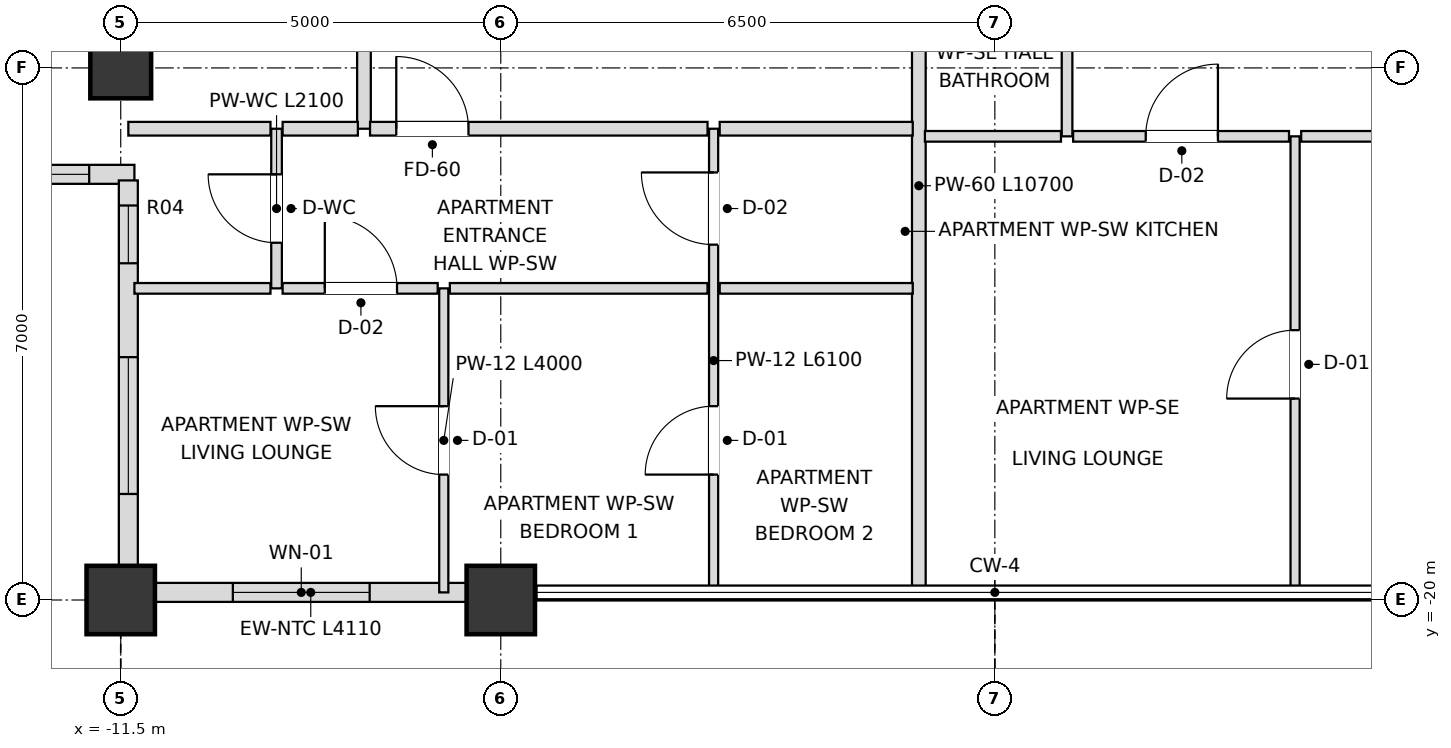
"""IFC4 building model, lengths in metres.
Left out: names, types, materials, properties, quantities, classifications, styles, units other than length and angle.
Written with IfcOpenShell. Run it as: python <this file> out.ifc"""

import sys

from ifc_helpers import new_model, si_unit, direction, frame, frame_2d, origin, origin_2d, place, context, subcontext, project, spatial, rectangle, extrude, element, fill, save


model = new_model("IFC4")
c1 = context("Model", 3, precision=1e-05, world=origin(), true_north=direction((0.0, 1.0)))
c2 = subcontext(c1, "Body", "Model", "MODEL_VIEW")
j1 = project(units=[si_unit("LENGTHUNIT", "METRE"), si_unit("PLANEANGLEUNIT", "RADIAN")], contexts=[c1])
p1 = place(None, origin())
s1 = spatial("IfcSite", under=j1, at=p1, CompositionType="ELEMENT")
p2 = place(p1, origin())
s2 = spatial("IfcBuilding", under=s1, at=p2, CompositionType="ELEMENT")
p3 = place(p2, frame((0.0, 0.0, 261.9)))
s3 = spatial("IfcBuildingStorey", under=s2, at=p3, CompositionType="ELEMENT", Elevation=261.9)
for number, where, z_axis, x_axis in (
    (1, (-11.5, -20.0, 0.0), (0.0, 0.0, 1.0), (1.0, 0.0, 0.0)),
    (2, (-6.5, -20.0, 0.0), (0.0, 0.0, 1.0), (1.0, 0.0, 0.0)),
):
    element("IfcColumn", number, at=place(p3, frame(where, z_axis=z_axis, x_axis=x_axis)), inside=s3, PredefinedType="USERDEFINED", context=c2, shape_type="SweptSolid", body=[
        extrude(rectangle(XDim=0.9, YDim=0.9, at=origin_2d()), origin(), (0.0, 0.0, 1.0), 3.6),
    ])
p4 = place(p3, frame((-11.5, -13.0, 0.0), z_axis=(0.0, 0.0, 1.0), x_axis=(1.0, 0.0, 0.0)))
e3 = element("IfcColumn", 3, at=p4, inside=s3, PredefinedType="COLUMN", context=c2, shape_type="SweptSolid", body=[
    extrude(rectangle(XDim=0.8, YDim=0.8, at=origin_2d()), origin(), (0.0, 0.0, 1.0), 3.6),
])
p5 = place(p3, frame((-11.055, -19.9, 0.0), z_axis=(0.0, 0.0, 1.0), x_axis=(1.0, 0.0, 0.0)))
e4 = element("IfcWall", 4, at=p5, inside=s3, PredefinedType="SOLIDWALL", context=c2, shape_type="SweptSolid", body=[
    extrude(rectangle(XDim=4.11, YDim=0.25, at=frame_2d((2.055, 0.0))), origin(), (0.0, 0.0, 1.0), 2.748),
])
p6 = place(p5, frame((1.03, 0.0, 0.72)))
e5 = element("IfcOpeningElement", 5, at=p6, cuts=e4, PredefinedType="OPENING", context=c2, shape_type="SweptSolid", body=[
    extrude(rectangle(XDim=1.8, YDim=1.68, at=frame_2d((0.9, 0.84))), frame((0.0, 0.135, 0.0), z_axis=(0.0, -1.0, 0.0), x_axis=(1.0, 0.0, 0.0)), (0.0, 0.0, 1.0), 0.27),
])
p7 = place(p3, frame((-16.98, -14.4, 0.0), z_axis=(0.0, 0.0, 1.0), x_axis=(1.0, 0.0, 0.0)))
e6 = element("IfcWall", 6, at=p7, inside=s3, PredefinedType="SOLIDWALL", context=c2, shape_type="SweptSolid", body=[
    extrude(rectangle(XDim=5.66, YDim=0.25, at=frame_2d((2.83, 0.0))), origin(), (0.0, 0.0, 1.0), 2.748),
])
p8 = place(p7, frame((0.595, 0.0, 0.72)))
e7 = element("IfcOpeningElement", 7, at=p8, cuts=e6, PredefinedType="OPENING", context=c2, shape_type="SweptSolid", body=[
    extrude(rectangle(XDim=1.8, YDim=1.68, at=frame_2d((0.9, 0.84))), frame((0.0, 0.135, 0.0), z_axis=(0.0, -1.0, 0.0), x_axis=(1.0, 0.0, 0.0)), (0.0, 0.0, 1.0), 0.27),
])
p9 = place(p7, frame((3.265, 0.0, 0.72)))
e8 = element("IfcOpeningElement", 8, at=p9, cuts=e6, PredefinedType="OPENING", context=c2, shape_type="SweptSolid", body=[
    extrude(rectangle(XDim=1.8, YDim=1.68, at=frame_2d((0.9, 0.84))), frame((0.0, 0.135, 0.0), z_axis=(0.0, -1.0, 0.0), x_axis=(1.0, 0.0, 0.0)), (0.0, 0.0, 1.0), 0.27),
])
p10 = place(p3, frame((-11.4, -14.48, 0.0), z_axis=(0.0, 0.0, 1.0), x_axis=(0.0, -1.0, 0.0)))
e9 = element("IfcWall", 9, at=p10, inside=s3, PredefinedType="SOLIDWALL", context=c2, shape_type="SweptSolid", body=[
    extrude(rectangle(XDim=5.34, YDim=0.25, at=frame_2d((2.67, 0.0))), origin(), (0.0, 0.0, 1.0), 2.748),
])
p11 = place(p10, frame((0.33, 0.0, 0.72)))
e10 = element("IfcOpeningElement", 10, at=p11, cuts=e9, PredefinedType="OPENING", context=c2, shape_type="SweptSolid", body=[
    extrude(rectangle(XDim=0.76, YDim=1.68, at=frame_2d((0.38, 0.84))), frame((0.0, 0.135, 0.0), z_axis=(0.0, -1.0, 0.0), x_axis=(1.0, 0.0, 0.0)), (0.0, 0.0, 1.0), 0.27),
])
p12 = place(p10, frame((2.325, 0.0, 0.72)))
e11 = element("IfcOpeningElement", 11, at=p12, cuts=e9, PredefinedType="OPENING", context=c2, shape_type="SweptSolid", body=[
    extrude(rectangle(XDim=1.8, YDim=1.68, at=frame_2d((0.9, 0.84))), frame((0.0, 0.135, 0.0), z_axis=(0.0, -1.0, 0.0), x_axis=(1.0, 0.0, 0.0)), (0.0, 0.0, 1.0), 0.27),
])
p13 = place(p3, frame((-9.45, -15.9, 0.0), z_axis=(0.0, 0.0, 1.0), x_axis=(0.0, 1.0, 0.0)))
e12 = element("IfcWall", 12, at=p13, inside=s3, PredefinedType="PARTITIONING", context=c2, shape_type="SweptSolid", body=[
    extrude(rectangle(XDim=2.1, YDim=0.14, at=frame_2d((1.05, 0.0))), origin(), (0.0, 0.0, 1.0), 3.38),
])
p14 = place(p13, frame((0.6, 0.0, 0.0)))
e13 = element("IfcOpeningElement", 13, at=p14, cuts=e12, PredefinedType="OPENING", context=c2, shape_type="SweptSolid", body=[
    extrude(rectangle(XDim=0.9, YDim=2.1, at=frame_2d((0.45, 1.05))), frame((0.0, 0.08, 0.0), z_axis=(0.0, -1.0, 0.0), x_axis=(1.0, 0.0, 0.0)), (0.0, 0.0, 1.0), 0.16),
])
p15 = place(p3, frame((-8.3, -13.8, 0.0), z_axis=(0.0, 0.0, 1.0), x_axis=(0.0, 1.0, 0.0)))
e14 = element("IfcWall", 14, at=p15, inside=s3, PredefinedType="PARTITIONING", context=c2, shape_type="SweptSolid", body=[
    extrude(rectangle(XDim=23.05, YDim=0.18, at=frame_2d((11.525, 0.0))), origin(), (0.0, 0.0, 1.0), 2.826),
])
p16 = place(p15, frame((3.225, 0.0, 0.0)))
e15 = element("IfcOpeningElement", 15, at=p16, cuts=e14, PredefinedType="OPENING", context=c2, shape_type="SweptSolid", body=[
    extrude(rectangle(XDim=0.95, YDim=2.15, at=frame_2d((0.475, 1.075))), frame((0.0, 0.1, 0.0), z_axis=(0.0, -1.0, 0.0), x_axis=(1.0, 0.0, 0.0)), (0.0, 0.0, 1.0), 0.2),
])
p17 = place(p15, frame((10.125, 0.0, 0.0)))
e16 = element("IfcOpeningElement", 16, at=p17, cuts=e14, PredefinedType="OPENING", context=c2, shape_type="SweptSolid", body=[
    extrude(rectangle(XDim=0.95, YDim=2.15, at=frame_2d((0.475, 1.075))), frame((0.0, 0.1, 0.0), z_axis=(0.0, -1.0, 0.0), x_axis=(1.0, 0.0, 0.0)), (0.0, 0.0, 1.0), 0.2),
])
p18 = place(p15, frame((16.725, 0.0, 0.0)))
e17 = element("IfcOpeningElement", 17, at=p18, cuts=e14, PredefinedType="OPENING", context=c2, shape_type="SweptSolid", body=[
    extrude(rectangle(XDim=0.95, YDim=2.15, at=frame_2d((0.475, 1.075))), frame((0.0, 0.1, 0.0), z_axis=(0.0, -1.0, 0.0), x_axis=(1.0, 0.0, 0.0)), (0.0, 0.0, 1.0), 0.2),
])
p19 = place(p3, frame((-7.25, -19.9, 0.0), z_axis=(0.0, 0.0, 1.0), x_axis=(0.0, 1.0, 0.0)))
e18 = element("IfcWall", 18, at=p19, inside=s3, PredefinedType="PARTITIONING", context=c2, shape_type="SweptSolid", body=[
    extrude(rectangle(XDim=4.0, YDim=0.12, at=frame_2d((2.0, 0.0))), origin(), (0.0, 0.0, 1.0), 3.38),
])
p20 = place(p19, frame((1.55, 0.0, 0.0)))
e19 = element("IfcOpeningElement", 19, at=p20, cuts=e18, PredefinedType="OPENING", context=c2, shape_type="SweptSolid", body=[
    extrude(rectangle(XDim=0.9, YDim=2.1, at=frame_2d((0.45, 1.05))), frame((0.0, 0.07, 0.0), z_axis=(0.0, -1.0, 0.0), x_axis=(1.0, 0.0, 0.0)), (0.0, 0.0, 1.0), 0.14),
])
p21 = place(p3, frame((-3.7, -19.9, 0.0), z_axis=(0.0, 0.0, 1.0), x_axis=(0.0, 1.0, 0.0)))
e20 = element("IfcWall", 20, at=p21, inside=s3, PredefinedType="PARTITIONING", context=c2, shape_type="SweptSolid", body=[
    extrude(rectangle(XDim=6.1, YDim=0.12, at=frame_2d((3.05, 0.0))), origin(), (0.0, 0.0, 1.0), 3.018),
])
p22 = place(p21, frame((4.575, 0.0, 0.0)))
e21 = element("IfcOpeningElement", 21, at=p22, cuts=e20, PredefinedType="OPENING", context=c2, shape_type="SweptSolid", body=[
    extrude(rectangle(XDim=0.95, YDim=2.1, at=frame_2d((0.475, 1.05))), frame((0.0, 0.07, 0.0), z_axis=(0.0, -1.0, 0.0), x_axis=(1.0, 0.0, 0.0)), (0.0, 0.0, 1.0), 0.14),
])
p23 = place(p21, frame((1.55, 0.0, 0.0)))
e22 = element("IfcOpeningElement", 22, at=p23, cuts=e20, PredefinedType="OPENING", context=c2, shape_type="SweptSolid", body=[
    extrude(rectangle(XDim=0.9, YDim=2.1, at=frame_2d((0.45, 1.05))), frame((0.0, 0.07, 0.0), z_axis=(0.0, -1.0, 0.0), x_axis=(1.0, 0.0, 0.0)), (0.0, 0.0, 1.0), 0.14),
])
p24 = place(p3, frame((-1.0, -19.9, 0.0), z_axis=(0.0, 0.0, 1.0), x_axis=(0.0, 1.0, 0.0)))
e23 = element("IfcWall", 23, at=p24, inside=s3, PredefinedType="PARTITIONING", context=c2, shape_type="SweptSolid", body=[
    extrude(rectangle(XDim=10.7, YDim=0.18, at=frame_2d((5.35, 0.0))), origin(), (0.0, 0.0, 1.0), 3.018),
])
p25 = place(p3, frame((0.95, -13.9, 0.0), z_axis=(0.0, 0.0, 1.0), x_axis=(0.0, 1.0, 0.0)))
e24 = element("IfcWall", 24, at=p25, inside=s3, PredefinedType="PARTITIONING", context=c2, shape_type="SweptSolid", body=[
    extrude(rectangle(XDim=4.7, YDim=0.14, at=frame_2d((2.35, 0.0))), origin(), (0.0, 0.0, 1.0), 3.38),
])
p26 = place(p25, frame((1.9, 0.0, 0.0)))
e25 = element("IfcOpeningElement", 25, at=p26, cuts=e24, PredefinedType="OPENING", context=c2, shape_type="SweptSolid", body=[
    extrude(rectangle(XDim=0.9, YDim=2.1, at=frame_2d((0.45, 1.05))), frame((0.0, 0.08, 0.0), z_axis=(0.0, -1.0, 0.0), x_axis=(1.0, 0.0, 0.0)), (0.0, 0.0, 1.0), 0.16),
])
p27 = place(p3, frame((3.95, -19.9, 0.0), z_axis=(0.0, 0.0, 1.0), x_axis=(0.0, 1.0, 0.0)))
e26 = element("IfcWall", 26, at=p27, inside=s3, PredefinedType="PARTITIONING", context=c2, shape_type="SweptSolid", body=[
    extrude(rectangle(XDim=6.0, YDim=0.12, at=frame_2d((3.0, 0.0))), origin(), (0.0, 0.0, 1.0), 3.018),
])
p28 = place(p27, frame((2.55, 0.0, 0.0)))
e27 = element("IfcOpeningElement", 27, at=p28, cuts=e26, PredefinedType="OPENING", context=c2, shape_type="SweptSolid", body=[
    extrude(rectangle(XDim=0.9, YDim=2.1, at=frame_2d((0.45, 1.05))), frame((0.0, 0.07, 0.0), z_axis=(0.0, -1.0, 0.0), x_axis=(1.0, 0.0, 0.0)), (0.0, 0.0, 1.0), 0.14),
])
p29 = place(p3, frame((-11.32, -15.9, 0.0), z_axis=(0.0, 0.0, 1.0), x_axis=(1.0, 0.0, 0.0)))
e28 = element("IfcWall", 28, at=p29, inside=s3, PredefinedType="PARTITIONING", context=c2, shape_type="SweptSolid", body=[
    extrude(rectangle(XDim=1.79, YDim=0.14, at=frame_2d((0.895, 0.0))), origin(), (0.0, 0.0, 1.0), 3.38),
])
p30 = place(p3, frame((-9.37, -15.9, 0.0), z_axis=(0.0, 0.0, 1.0), x_axis=(1.0, 0.0, 0.0)))
e29 = element("IfcWall", 29, at=p30, inside=s3, PredefinedType="PARTITIONING", context=c2, shape_type="SweptSolid", body=[
    extrude(rectangle(XDim=2.04, YDim=0.14, at=frame_2d((1.02, 0.0))), origin(), (0.0, 0.0, 1.0), 3.38),
])
p31 = place(p30, frame((0.555, 0.0, 0.0)))
e30 = element("IfcOpeningElement", 30, at=p31, cuts=e29, PredefinedType="OPENING", context=c2, shape_type="SweptSolid", body=[
    extrude(rectangle(XDim=0.95, YDim=2.1, at=frame_2d((0.475, 1.05))), frame((0.0, 0.08, 0.0), z_axis=(0.0, -1.0, 0.0), x_axis=(1.0, 0.0, 0.0)), (0.0, 0.0, 1.0), 0.16),
])
p32 = place(p3, frame((-7.17, -15.9, 0.0), z_axis=(0.0, 0.0, 1.0), x_axis=(1.0, 0.0, 0.0)))
e31 = element("IfcWall", 31, at=p32, inside=s3, PredefinedType="PARTITIONING", context=c2, shape_type="SweptSolid", body=[
    extrude(rectangle(XDim=3.39, YDim=0.14, at=frame_2d((1.695, 0.0))), origin(), (0.0, 0.0, 1.0), 2.826),
])
p33 = place(p3, frame((-3.62, -15.9, 0.0), z_axis=(0.0, 0.0, 1.0), x_axis=(1.0, 0.0, 0.0)))
e32 = element("IfcWall", 32, at=p33, inside=s3, PredefinedType="PARTITIONING", context=c2, shape_type="SweptSolid", body=[
    extrude(rectangle(XDim=2.54, YDim=0.14, at=frame_2d((1.27, 0.0))), origin(), (0.0, 0.0, 1.0), 3.38),
])
p34 = place(p3, frame((-0.92, -13.9, 0.0), z_axis=(0.0, 0.0, 1.0), x_axis=(1.0, 0.0, 0.0)))
e33 = element("IfcWall", 33, at=p34, inside=s3, PredefinedType="PARTITIONING", context=c2, shape_type="SweptSolid", body=[
    extrude(rectangle(XDim=1.79, YDim=0.14, at=frame_2d((0.895, 0.0))), origin(), (0.0, 0.0, 1.0), 3.38),
])
p35 = place(p3, frame((1.03, -13.9, 0.0), z_axis=(0.0, 0.0, 1.0), x_axis=(1.0, 0.0, 0.0)))
e34 = element("IfcWall", 34, at=p35, inside=s3, PredefinedType="PARTITIONING", context=c2, shape_type="SweptSolid", body=[
    extrude(rectangle(XDim=2.84, YDim=0.14, at=frame_2d((1.42, 0.0))), origin(), (0.0, 0.0, 1.0), 3.38),
])
p36 = place(p35, frame((0.955, 0.0, 0.0)))
e35 = element("IfcOpeningElement", 35, at=p36, cuts=e34, PredefinedType="OPENING", context=c2, shape_type="SweptSolid", body=[
    extrude(rectangle(XDim=0.95, YDim=2.1, at=frame_2d((0.475, 1.05))), frame((0.0, 0.08, 0.0), z_axis=(0.0, -1.0, 0.0), x_axis=(1.0, 0.0, 0.0)), (0.0, 0.0, 1.0), 0.16),
])
p37 = place(p3, frame((4.03, -13.9, 0.0), z_axis=(0.0, 0.0, 1.0), x_axis=(1.0, 0.0, 0.0)))
e36 = element("IfcWall", 36, at=p37, inside=s3, PredefinedType="PARTITIONING", context=c2, shape_type="SweptSolid", body=[
    extrude(rectangle(XDim=1.04, YDim=0.14, at=frame_2d((0.52, 0.0))), origin(), (0.0, 0.0, 1.0), 3.38),
])
p38 = place(p3, frame((-11.4, -13.8, 0.0), z_axis=(0.0, 0.0, 1.0), x_axis=(1.0, 0.0, 0.0)))
e37 = element("IfcWall", 37, at=p38, inside=s3, PredefinedType="PARTITIONING", context=c2, shape_type="SweptSolid", body=[
    extrude(rectangle(XDim=1.87, YDim=0.18, at=frame_2d((0.935, 0.0))), origin(), (0.0, 0.0, 1.0), 3.38),
])
p39 = place(p3, frame((-9.37, -13.8, 0.0), z_axis=(0.0, 0.0, 1.0), x_axis=(1.0, 0.0, 0.0)))
e38 = element("IfcWall", 38, at=p39, inside=s3, PredefinedType="PARTITIONING", context=c2, shape_type="SweptSolid", body=[
    extrude(rectangle(XDim=0.99, YDim=0.18, at=frame_2d((0.495, 0.0))), origin(), (0.0, 0.0, 1.0), 3.38),
])
p40 = place(p3, frame((-8.22, -13.8, 0.0), z_axis=(0.0, 0.0, 1.0), x_axis=(1.0, 0.0, 0.0)))
e39 = element("IfcWall", 39, at=p40, inside=s3, PredefinedType="PARTITIONING", context=c2, shape_type="SweptSolid", body=[
    extrude(rectangle(XDim=4.44, YDim=0.18, at=frame_2d((2.22, 0.0))), origin(), (0.0, 0.0, 1.0), 2.826),
])
p41 = place(p40, frame((0.345, 0.0, 0.0)))
e40 = element("IfcOpeningElement", 40, at=p41, cuts=e39, PredefinedType="OPENING", context=c2, shape_type="SweptSolid", body=[
    extrude(rectangle(XDim=0.95, YDim=2.15, at=frame_2d((0.475, 1.075))), frame((0.0, 0.1, 0.0), z_axis=(0.0, -1.0, 0.0), x_axis=(1.0, 0.0, 0.0)), (0.0, 0.0, 1.0), 0.2),
])
p42 = place(p3, frame((-3.62, -13.8, 0.0), z_axis=(0.0, 0.0, 1.0), x_axis=(1.0, 0.0, 0.0)))
e41 = element("IfcWall", 41, at=p42, inside=s3, PredefinedType="PARTITIONING", context=c2, shape_type="SweptSolid", body=[
    extrude(rectangle(XDim=2.54, YDim=0.18, at=frame_2d((1.27, 0.0))), origin(), (0.0, 0.0, 1.0), 3.38),
])
p43 = place(p6, origin())
e42 = element("IfcWindow", 42, at=p43, inside=s3, PartitioningType="SINGLE_PANEL", PredefinedType="WINDOW", context=c2, shape_type="SweptSolid", body=[
    extrude(rectangle(XDim=1.8, YDim=1.68, at=frame_2d((0.9, 0.84))), frame((0.0, 0.03, 0.0), z_axis=(0.0, -1.0, 0.0), x_axis=(1.0, 0.0, 0.0)), (0.0, 0.0, 1.0), 0.06),
])
fill(e5, e42)
p44 = place(p9, origin())
e43 = element("IfcWindow", 43, at=p44, inside=s3, PartitioningType="SINGLE_PANEL", PredefinedType="WINDOW", context=c2, shape_type="SweptSolid", body=[
    extrude(rectangle(XDim=1.8, YDim=1.68, at=frame_2d((0.9, 0.84))), frame((0.0, 0.03, 0.0), z_axis=(0.0, -1.0, 0.0), x_axis=(1.0, 0.0, 0.0)), (0.0, 0.0, 1.0), 0.06),
])
fill(e8, e43)
p45 = place(p11, origin())
e44 = element("IfcWindow", 44, at=p45, inside=s3, PartitioningType="SINGLE_PANEL", PredefinedType="WINDOW", context=c2, shape_type="SweptSolid", body=[
    extrude(rectangle(XDim=0.76, YDim=1.68, at=frame_2d((0.38, 0.84))), frame((0.0, 0.03, 0.0), z_axis=(0.0, -1.0, 0.0), x_axis=(1.0, 0.0, 0.0)), (0.0, 0.0, 1.0), 0.06),
])
fill(e10, e44)
p46 = place(p12, origin())
e45 = element("IfcWindow", 45, at=p46, inside=s3, PartitioningType="SINGLE_PANEL", PredefinedType="WINDOW", context=c2, shape_type="SweptSolid", body=[
    extrude(rectangle(XDim=1.8, YDim=1.68, at=frame_2d((0.9, 0.84))), frame((0.0, 0.03, 0.0), z_axis=(0.0, -1.0, 0.0), x_axis=(1.0, 0.0, 0.0)), (0.0, 0.0, 1.0), 0.06),
])
fill(e11, e45)
p47 = place(p14, origin())
e46 = element("IfcDoor", 46, at=p47, inside=s3, OperationType="SINGLE_SWING_RIGHT", PredefinedType="DOOR", context=c2, shape_type="SweptSolid", body=[
    extrude(rectangle(XDim=0.9, YDim=2.1, at=frame_2d((0.45, 1.05))), frame((0.0, 0.025, 0.0), z_axis=(0.0, -1.0, 0.0), x_axis=(1.0, 0.0, 0.0)), (0.0, 0.0, 1.0), 0.05),
])
fill(e13, e46)
p48 = place(p41, origin())
e47 = element("IfcDoor", 47, at=p48, inside=s3, OperationType="SINGLE_SWING_LEFT", PredefinedType="DOOR", context=c2, shape_type="SweptSolid", body=[
    extrude(rectangle(XDim=0.95, YDim=2.15, at=frame_2d((0.475, 1.075))), frame((0.0, 0.025, 0.0), z_axis=(0.0, -1.0, 0.0), x_axis=(1.0, 0.0, 0.0)), (0.0, 0.0, 1.0), 0.05),
])
fill(e40, e47)
p49 = place(p22, origin())
e48 = element("IfcDoor", 48, at=p49, inside=s3, OperationType="SINGLE_SWING_RIGHT", PredefinedType="DOOR", context=c2, shape_type="SweptSolid", body=[
    extrude(rectangle(XDim=0.95, YDim=2.1, at=frame_2d((0.475, 1.05))), frame((0.0, 0.025, 0.0), z_axis=(0.0, -1.0, 0.0), x_axis=(1.0, 0.0, 0.0)), (0.0, 0.0, 1.0), 0.05),
])
fill(e21, e48)
p50 = place(p31, origin())
e49 = element("IfcDoor", 49, at=p50, inside=s3, OperationType="SINGLE_SWING_LEFT", PredefinedType="DOOR", context=c2, shape_type="SweptSolid", body=[
    extrude(rectangle(XDim=0.95, YDim=2.1, at=frame_2d((0.475, 1.05))), frame((0.0, 0.025, 0.0), z_axis=(0.0, -1.0, 0.0), x_axis=(1.0, 0.0, 0.0)), (0.0, 0.0, 1.0), 0.05),
])
fill(e30, e49)
p51 = place(p20, origin())
e50 = element("IfcDoor", 50, at=p51, inside=s3, OperationType="SINGLE_SWING_RIGHT", PredefinedType="DOOR", context=c2, shape_type="SweptSolid", body=[
    extrude(rectangle(XDim=0.9, YDim=2.1, at=frame_2d((0.45, 1.05))), frame((0.0, 0.025, 0.0), z_axis=(0.0, -1.0, 0.0), x_axis=(1.0, 0.0, 0.0)), (0.0, 0.0, 1.0), 0.05),
])
fill(e19, e50)
p52 = place(p23, origin())
e51 = element("IfcDoor", 51, at=p52, inside=s3, OperationType="SINGLE_SWING_LEFT", PredefinedType="DOOR", context=c2, shape_type="SweptSolid", body=[
    extrude(rectangle(XDim=0.9, YDim=2.1, at=frame_2d((0.45, 1.05))), frame((0.0, 0.025, 0.0), z_axis=(0.0, -1.0, 0.0), x_axis=(1.0, 0.0, 0.0)), (0.0, 0.0, 1.0), 0.05),
])
fill(e22, e51)
p53 = place(p36, origin())
e52 = element("IfcDoor", 52, at=p53, inside=s3, OperationType="SINGLE_SWING_RIGHT", PredefinedType="DOOR", context=c2, shape_type="SweptSolid", body=[
    extrude(rectangle(XDim=0.95, YDim=2.1, at=frame_2d((0.475, 1.05))), frame((0.0, 0.025, 0.0), z_axis=(0.0, -1.0, 0.0), x_axis=(1.0, 0.0, 0.0)), (0.0, 0.0, 1.0), 0.05),
])
fill(e35, e52)
p54 = place(p28, origin())
e53 = element("IfcDoor", 53, at=p54, inside=s3, OperationType="SINGLE_SWING_LEFT", PredefinedType="DOOR", context=c2, shape_type="SweptSolid", body=[
    extrude(rectangle(XDim=0.9, YDim=2.1, at=frame_2d((0.45, 1.05))), frame((0.0, 0.025, 0.0), z_axis=(0.0, -1.0, 0.0), x_axis=(1.0, 0.0, 0.0)), (0.0, 0.0, 1.0), 0.05),
])
fill(e27, e53)
save(model, sys.argv[1])
